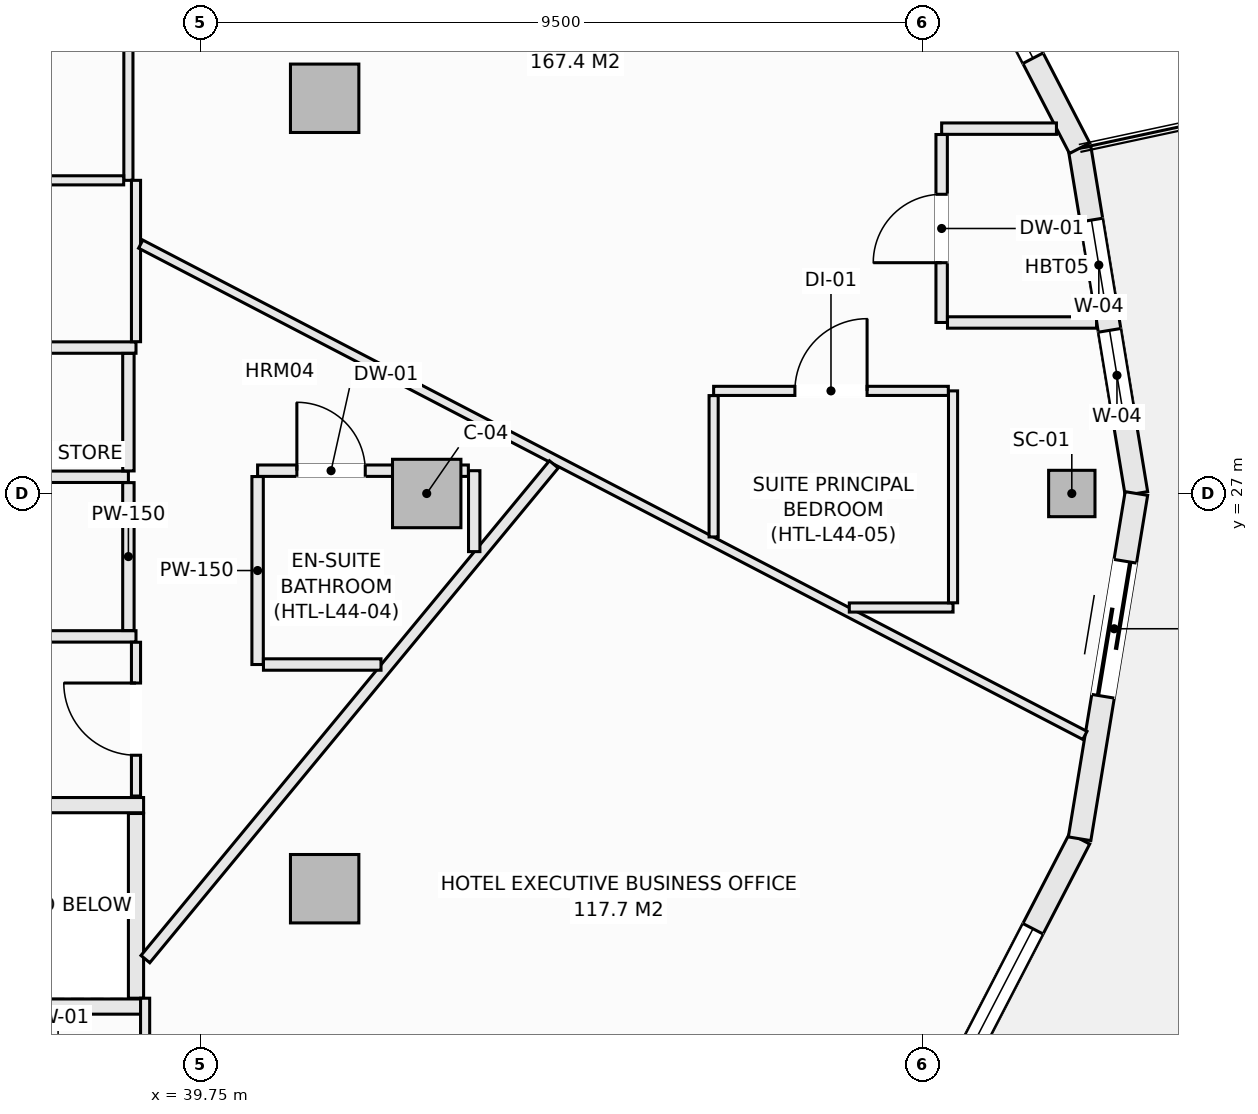
"""IFC4 building model, lengths in metres.
Left out: names, types, materials, properties, quantities, classifications, styles, units other than length and angle.
Written with IfcOpenShell. Run it as: python <this file> out.ifc"""

import sys

from ifc_helpers import new_model, si_unit, direction, frame, frame_2d, origin, origin_2d, place, context, subcontext, project, spatial, rectangle, hollow_rectangle, extrude, element, fill, save


model = new_model("IFC4")
c1 = context("Model", 3, precision=1e-05, world=origin(), true_north=direction((0.0, 1.0)))
c2 = subcontext(c1, "Body", "Model", "MODEL_VIEW")
j1 = project(units=[si_unit("LENGTHUNIT", "METRE"), si_unit("PLANEANGLEUNIT", "RADIAN")], contexts=[c1])
p1 = place(None, origin())
s1 = spatial("IfcSite", under=j1, at=p1, CompositionType="ELEMENT")
p2 = place(p1, origin())
s2 = spatial("IfcBuilding", under=s1, at=p2, CompositionType="ELEMENT")
p3 = place(p2, frame((0.0, 0.0, 169.9)))
s3 = spatial("IfcBuildingStorey", under=s2, at=p3, CompositionType="ELEMENT", Elevation=169.9)
p4 = place(p3, frame((51.212, 27.0, -0.27), z_axis=(0.0, 0.0, 1.0), x_axis=(1.0, 0.0, 0.0)))
e1 = element("IfcColumn", 1, at=p4, inside=s3, PredefinedType="COLUMN", context=c2, shape_type="SweptSolid", body=[
    extrude(hollow_rectangle(XDim=0.61, YDim=0.61, WallThickness=0.025, at=origin_2d()), origin(), (0.0, 0.0, 1.0), 3.4),
])
for number, where, z_axis, x_axis in (
    (2, (42.725, 27.0, -0.27), (0.0, 0.0, 1.0), (1.0, 0.0, 0.0)),
    (3, (41.382, 32.199, -0.27), (0.0, 0.0, 1.0), (1.0, 0.0, 0.0)),
    (4, (41.382, 21.801, -0.27), (0.0, 0.0, 1.0), (1.0, 0.0, 0.0)),
):
    element("IfcColumn", number, at=place(p3, frame(where, z_axis=z_axis, x_axis=x_axis)), inside=s3, PredefinedType="COLUMN", context=c2, shape_type="SweptSolid", body=[
        extrude(rectangle(XDim=0.9, YDim=0.9, at=origin_2d()), origin(), (0.0, 0.0, 1.0), 3.4),
    ])
p5 = place(p3, frame((51.315, 31.542, 0.0), z_axis=(0.0, 0.0, 1.0), x_axis=(0.162394765401, -0.986725868806, 0.0)))
e5 = element("IfcWall", 5, at=p5, inside=s3, PredefinedType="SOLIDWALL", context=c2, shape_type="SweptSolid", body=[
    extrude(rectangle(XDim=4.603, YDim=0.3, at=frame_2d((2.302, 0.0))), origin(), (0.0, 0.0, 1.0), 2.653),
])
p6 = place(p5, frame((0.958, 0.0, 0.74)))
e6 = element("IfcOpeningElement", 6, at=p6, cuts=e5, PredefinedType="OPENING", context=c2, shape_type="SweptSolid", body=[
    extrude(rectangle(XDim=1.2, YDim=1.7, at=frame_2d((0.6, 0.85))), frame((0.0, 0.16, 0.0), z_axis=(0.0, -1.0, 0.0), x_axis=(1.0, 0.0, 0.0)), (0.0, 0.0, 1.0), 0.32),
])
p7 = place(p5, frame((2.428, 0.0, 0.74)))
e7 = element("IfcOpeningElement", 7, at=p7, cuts=e5, PredefinedType="OPENING", context=c2, shape_type="SweptSolid", body=[
    extrude(rectangle(XDim=1.2, YDim=1.7, at=frame_2d((0.6, 0.85))), frame((0.0, 0.16, 0.0), z_axis=(0.0, -1.0, 0.0), x_axis=(1.0, 0.0, 0.0)), (0.0, 0.0, 1.0), 0.32),
])
p8 = place(p3, frame((49.123, 35.775, 0.0), z_axis=(0.0, 0.0, 1.0), x_axis=(0.459810251451, -0.888017191647, 0.0)))
e8 = element("IfcWall", 8, at=p8, inside=s3, PredefinedType="SOLIDWALL", context=c2, shape_type="SweptSolid", body=[
    extrude(rectangle(XDim=4.766, YDim=0.3, at=frame_2d((2.383, 0.0))), origin(), (0.0, 0.0, 1.0), 2.653),
])
p9 = place(p8, frame((1.333, 0.0, 0.74)))
e9 = element("IfcOpeningElement", 9, at=p9, cuts=e8, PredefinedType="OPENING", context=c2, shape_type="SweptSolid", body=[
    extrude(rectangle(XDim=2.1, YDim=1.7, at=frame_2d((1.05, 0.85))), frame((0.0, 0.16, 0.0), z_axis=(0.0, -1.0, 0.0), x_axis=(1.0, 0.0, 0.0)), (0.0, 0.0, 1.0), 0.32),
])
p10 = place(p3, frame((49.123, 18.225, 0.0), z_axis=(0.0, 0.0, 1.0), x_axis=(0.459810251451, 0.888017191647, 0.0)))
e10 = element("IfcWall", 10, at=p10, inside=s3, PredefinedType="SOLIDWALL", context=c2, shape_type="SweptSolid", body=[
    extrude(rectangle(XDim=4.766, YDim=0.3, at=frame_2d((2.383, 0.0))), origin(), (0.0, 0.0, 1.0), 2.653),
])
p11 = place(p10, frame((1.333, 0.0, 0.74)))
e11 = element("IfcOpeningElement", 11, at=p11, cuts=e10, PredefinedType="OPENING", context=c2, shape_type="SweptSolid", body=[
    extrude(rectangle(XDim=2.1, YDim=1.7, at=frame_2d((1.05, 0.85))), frame((0.0, 0.16, 0.0), z_axis=(0.0, -1.0, 0.0), x_axis=(1.0, 0.0, 0.0)), (0.0, 0.0, 1.0), 0.32),
])
p12 = place(p3, frame((51.315, 22.458, 0.0), z_axis=(0.0, 0.0, 1.0), x_axis=(0.162394765401, 0.986725868806, 0.0)))
e12 = element("IfcWall", 12, at=p12, inside=s3, PredefinedType="SOLIDWALL", context=c2, shape_type="SweptSolid", body=[
    extrude(rectangle(XDim=4.603, YDim=0.3, at=frame_2d((2.302, 0.0))), origin(), (0.0, 0.0, 1.0), 2.653),
])
p13 = place(p12, frame((1.9, 0.0, 0.0)))
e13 = element("IfcOpeningElement", 13, at=p13, cuts=e12, PredefinedType="OPENING", context=c2, shape_type="SweptSolid", body=[
    extrude(rectangle(XDim=1.8, YDim=2.25, at=frame_2d((0.9, 1.125))), frame((0.0, 0.16, 0.0), z_axis=(0.0, -1.0, 0.0), x_axis=(1.0, 0.0, 0.0)), (0.0, 0.0, 1.0), 0.32),
])
p14 = place(p3, frame((52.18, 16.779, 0.0), z_axis=(0.0, 0.0, 1.0), x_axis=(0.439637174641, 0.898175458735, 0.0)))
e14 = element("IfcWall", 14, at=p14, inside=s3, PredefinedType="PARAPET", context=c2, shape_type="SweptSolid", body=[
    extrude(rectangle(XDim=5.567, YDim=0.22, at=frame_2d((2.784, 0.0))), origin(), (0.0, 0.0, 1.0), 0.52),
])
for number, where, z_axis, x_axis in (
    (15, (36.75, 22.9, 0.0), (0.0, 0.0, 1.0), (1.0, 0.0, 0.0)),
    (16, (36.75, 20.25, 0.0), (0.0, 0.0, 1.0), (1.0, 0.0, 0.0)),
):
    element("IfcWall", number, at=place(p3, frame(where, z_axis=z_axis, x_axis=x_axis)), inside=s3, PredefinedType="SOLIDWALL", context=c2, shape_type="SweptSolid", body=[
        extrude(rectangle(XDim=2.25, YDim=0.2, at=frame_2d((1.125, 0.0))), origin(), (0.0, 0.0, 1.0), 3.13),
    ])
p15 = place(p3, frame((38.9, 20.36, 0.0), z_axis=(0.0, 0.0, 1.0), x_axis=(0.0, 1.0, 0.0)))
e17 = element("IfcWall", 17, at=p15, inside=s3, PredefinedType="SOLIDWALL", context=c2, shape_type="SweptSolid", body=[
    extrude(rectangle(XDim=2.43, YDim=0.2, at=frame_2d((1.215, 0.0))), origin(), (0.0, 0.0, 1.0), 3.13),
])
p16 = place(p3, frame((30.077, 28.92, 0.0), z_axis=(0.0, 0.0, 1.0), x_axis=(1.0, 0.0, 0.0)))
e18 = element("IfcWall", 18, at=p16, inside=s3, PredefinedType="PARTITIONING", context=c2, shape_type="SweptSolid", body=[
    extrude(rectangle(XDim=8.823, YDim=0.15, at=frame_2d((4.412, 0.0))), origin(), (0.0, 0.0, 1.0), 3.13),
])
p17 = place(p16, frame((1.342, 0.0, 0.0)))
e19 = element("IfcOpeningElement", 19, at=p17, cuts=e18, PredefinedType="OPENING", context=c2, shape_type="SweptSolid", body=[
    extrude(rectangle(XDim=0.95, YDim=2.1, at=frame_2d((0.475, 1.05))), frame((0.0, 0.085, 0.0), z_axis=(0.0, -1.0, 0.0), x_axis=(1.0, 0.0, 0.0)), (0.0, 0.0, 1.0), 0.17),
])
p18 = place(p16, frame((5.343, 0.0, 0.0)))
e20 = element("IfcOpeningElement", 20, at=p18, cuts=e18, PredefinedType="OPENING", context=c2, shape_type="SweptSolid", body=[
    extrude(rectangle(XDim=0.95, YDim=2.1, at=frame_2d((0.475, 1.05))), frame((0.0, 0.085, 0.0), z_axis=(0.0, -1.0, 0.0), x_axis=(1.0, 0.0, 0.0)), (0.0, 0.0, 1.0), 0.17),
])
p19 = place(p3, frame((33.377, 25.12, 0.0), z_axis=(0.0, 0.0, 1.0), x_axis=(1.0, 0.0, 0.0)))
e21 = element("IfcWall", 21, at=p19, inside=s3, PredefinedType="PARTITIONING", context=c2, shape_type="SweptSolid", body=[
    extrude(rectangle(XDim=5.523, YDim=0.15, at=frame_2d((2.761, 0.0))), origin(), (0.0, 0.0, 1.0), 3.13),
])
p20 = place(p19, frame((2.287, 0.0, 0.0)))
e22 = element("IfcOpeningElement", 22, at=p20, cuts=e21, PredefinedType="OPENING", context=c2, shape_type="SweptSolid", body=[
    extrude(rectangle(XDim=0.95, YDim=2.1, at=frame_2d((0.475, 1.05))), frame((0.0, 0.085, 0.0), z_axis=(0.0, -1.0, 0.0), x_axis=(1.0, 0.0, 0.0)), (0.0, 0.0, 1.0), 0.17),
])
p21 = place(p3, frame((33.377, 27.22, 0.0), z_axis=(0.0, 0.0, 1.0), x_axis=(1.0, 0.0, 0.0)))
e23 = element("IfcWall", 23, at=p21, inside=s3, PredefinedType="PARTITIONING", context=c2, shape_type="SweptSolid", body=[
    extrude(rectangle(XDim=5.423, YDim=0.15, at=frame_2d((2.711, 0.0))), origin(), (0.0, 0.0, 1.0), 3.13),
])
p22 = place(p3, frame((38.8, 25.197, 0.0), z_axis=(0.0, 0.0, 1.0), x_axis=(0.0, 1.0, 0.0)))
e24 = element("IfcWall", 24, at=p22, inside=s3, PredefinedType="PARTITIONING", context=c2, shape_type="SweptSolid", body=[
    extrude(rectangle(XDim=1.946, YDim=0.15, at=frame_2d((0.973, 0.0))), origin(), (0.0, 0.0, 1.0), 3.13),
])
p23 = place(p3, frame((38.8, 27.297, 0.0), z_axis=(0.0, 0.0, 1.0), x_axis=(0.0, 1.0, 0.0)))
e25 = element("IfcWall", 25, at=p23, inside=s3, PredefinedType="PARTITIONING", context=c2, shape_type="SweptSolid", body=[
    extrude(rectangle(XDim=1.546, YDim=0.15, at=frame_2d((0.773, 0.0))), origin(), (0.0, 0.0, 1.0), 3.13),
])
p24 = place(p3, frame((38.8, 31.12, 0.0), z_axis=(0.0, 0.0, 1.0), x_axis=(0.0, 1.0, 0.0)))
e26 = element("IfcWall", 26, at=p24, inside=s3, PredefinedType="PARTITIONING", context=c2, shape_type="SweptSolid", body=[
    extrude(rectangle(XDim=2.63, YDim=0.12, at=frame_2d((1.315, 0.0))), origin(), (0.0, 0.0, 1.0), 3.13),
])
p25 = place(p3, frame((30.062, 31.12, 0.0), z_axis=(0.0, 0.0, 1.0), x_axis=(1.0, 0.0, 0.0)))
e27 = element("IfcWall", 27, at=p25, inside=s3, PredefinedType="PARTITIONING", context=c2, shape_type="SweptSolid", body=[
    extrude(rectangle(XDim=8.676, YDim=0.12, at=frame_2d((4.338, 0.0))), origin(), (0.0, 0.0, 1.0), 3.13),
])
p26 = place(p25, frame((3.863, 0.0, 0.0)))
e28 = element("IfcOpeningElement", 28, at=p26, cuts=e27, PredefinedType="OPENING", context=c2, shape_type="SweptSolid", body=[
    extrude(rectangle(XDim=0.95, YDim=2.1, at=frame_2d((0.475, 1.05))), frame((0.0, 0.07, 0.0), z_axis=(0.0, -1.0, 0.0), x_axis=(1.0, 0.0, 0.0)), (0.0, 0.0, 1.0), 0.14),
])
p27 = place(p3, frame((39.02, 19.44, 0.0), z_axis=(0.0, 0.0, 1.0), x_axis=(0.0, 1.0, 0.0)))
e29 = element("IfcWall", 29, at=p27, inside=s3, PredefinedType="PARTITIONING", context=c2, shape_type="SweptSolid", body=[
    extrude(rectangle(XDim=0.92, YDim=0.12, at=frame_2d((0.46, 0.0))), origin(), (0.0, 0.0, 1.0), 3.13),
])
p28 = place(p3, frame((38.9, 23.02, 0.0), z_axis=(0.0, 0.0, 1.0), x_axis=(0.0, 1.0, 0.0)))
e30 = element("IfcWall", 30, at=p28, inside=s3, PredefinedType="PARTITIONING", context=c2, shape_type="SweptSolid", body=[
    extrude(rectangle(XDim=2.023, YDim=0.12, at=frame_2d((1.011, 0.0))), origin(), (0.0, 0.0, 1.0), 3.13),
])
p29 = place(p28, frame((0.537, 0.0, 0.0)))
e31 = element("IfcOpeningElement", 31, at=p29, cuts=e30, PredefinedType="OPENING", context=c2, shape_type="SweptSolid", body=[
    extrude(rectangle(XDim=0.95, YDim=2.1, at=frame_2d((0.475, 1.05))), frame((0.0, 0.07, 0.0), z_axis=(0.0, -1.0, 0.0), x_axis=(1.0, 0.0, 0.0)), (0.0, 0.0, 1.0), 0.14),
])
p30 = place(p3, frame((38.9, 28.997, 0.0), z_axis=(0.0, 0.0, 1.0), x_axis=(0.0, 1.0, 0.0)))
e32 = element("IfcWall", 32, at=p30, inside=s3, PredefinedType="PARTITIONING", context=c2, shape_type="SweptSolid", body=[
    extrude(rectangle(XDim=2.123, YDim=0.12, at=frame_2d((1.062, 0.0))), origin(), (0.0, 0.0, 1.0), 3.13),
])
p31 = place(p3, frame((38.962, 30.281, 0.0), z_axis=(0.0, 0.0, 1.0), x_axis=(0.887114590422, -0.461549242725, 0.0)))
e33 = element("IfcWall", 33, at=p31, inside=s3, PredefinedType="PARTITIONING", context=c2, shape_type="SweptSolid", body=[
    extrude(rectangle(XDim=14.004, YDim=0.12, at=frame_2d((7.002, 0.0))), origin(), (0.0, 0.0, 1.0), 2.505),
])
p32 = place(p3, frame((39.023, 20.874, 0.0), z_axis=(0.0, 0.0, 1.0), x_axis=(0.636698291185, 0.771113017658, 0.0)))
e34 = element("IfcWall", 34, at=p32, inside=s3, PredefinedType="PARTITIONING", context=c2, shape_type="SweptSolid", body=[
    extrude(rectangle(XDim=8.44, YDim=0.15, at=frame_2d((4.22, 0.0))), origin(), (0.0, 0.0, 1.0), 2.505),
])
p33 = place(p3, frame((43.35, 26.235, 0.0), z_axis=(0.0, 0.0, 1.0), x_axis=(0.0, 1.0, 0.0)))
e35 = element("IfcWall", 35, at=p33, inside=s3, PredefinedType="PARTITIONING", context=c2, shape_type="SweptSolid", body=[
    extrude(rectangle(XDim=1.065, YDim=0.15, at=frame_2d((0.532, 0.0))), origin(), (0.0, 0.0, 1.0), 3.13),
])
p34 = place(p3, frame((40.5, 27.3, 0.0), z_axis=(0.0, 0.0, 1.0), x_axis=(1.0, 0.0, 0.0)))
e36 = element("IfcWall", 36, at=p34, inside=s3, PredefinedType="PARTITIONING", context=c2, shape_type="SweptSolid", body=[
    extrude(rectangle(XDim=2.773, YDim=0.15, at=frame_2d((1.386, 0.0))), origin(), (0.0, 0.0, 1.0), 3.13),
])
p35 = place(p34, frame((0.517, 0.0, 0.0)))
e37 = element("IfcOpeningElement", 37, at=p35, cuts=e36, PredefinedType="OPENING", context=c2, shape_type="SweptSolid", body=[
    extrude(rectangle(XDim=0.9, YDim=2.1, at=frame_2d((0.45, 1.05))), frame((0.0, 0.085, 0.0), z_axis=(0.0, -1.0, 0.0), x_axis=(1.0, 0.0, 0.0)), (0.0, 0.0, 1.0), 0.17),
])
p36 = place(p3, frame((40.5, 24.75, 0.0), z_axis=(0.0, 0.0, 1.0), x_axis=(0.0, 1.0, 0.0)))
e38 = element("IfcWall", 38, at=p36, inside=s3, PredefinedType="PARTITIONING", context=c2, shape_type="SweptSolid", body=[
    extrude(rectangle(XDim=2.473, YDim=0.15, at=frame_2d((1.236, 0.0))), origin(), (0.0, 0.0, 1.0), 3.13),
])
p37 = place(p3, frame((40.577, 24.75, 0.0), z_axis=(0.0, 0.0, 1.0), x_axis=(1.0, 0.0, 0.0)))
e39 = element("IfcWall", 39, at=p37, inside=s3, PredefinedType="PARTITIONING", context=c2, shape_type="SweptSolid", body=[
    extrude(rectangle(XDim=1.547, YDim=0.15, at=frame_2d((0.773, 0.0))), origin(), (0.0, 0.0, 1.0), 3.13),
])
p38 = place(p3, frame((49.5, 31.8, 0.0), z_axis=(0.0, 0.0, 1.0), x_axis=(1.0, 0.0, 0.0)))
e40 = element("IfcWall", 40, at=p38, inside=s3, PredefinedType="PARTITIONING", context=c2, shape_type="SweptSolid", body=[
    extrude(rectangle(XDim=1.51, YDim=0.15, at=frame_2d((0.755, 0.0))), origin(), (0.0, 0.0, 1.0), 3.13),
])
p39 = place(p3, frame((49.5, 29.25, 0.0), z_axis=(0.0, 0.0, 1.0), x_axis=(0.0, 1.0, 0.0)))
e41 = element("IfcWall", 41, at=p39, inside=s3, PredefinedType="PARTITIONING", context=c2, shape_type="SweptSolid", body=[
    extrude(rectangle(XDim=2.473, YDim=0.15, at=frame_2d((1.236, 0.0))), origin(), (0.0, 0.0, 1.0), 2.653),
])
p40 = place(p39, frame((0.787, 0.0, 0.0)))
e42 = element("IfcOpeningElement", 42, at=p40, cuts=e41, PredefinedType="OPENING", context=c2, shape_type="SweptSolid", body=[
    extrude(rectangle(XDim=0.9, YDim=2.1, at=frame_2d((0.45, 1.05))), frame((0.0, 0.085, 0.0), z_axis=(0.0, -1.0, 0.0), x_axis=(1.0, 0.0, 0.0)), (0.0, 0.0, 1.0), 0.17),
])
p41 = place(p3, frame((49.577, 29.25, 0.0), z_axis=(0.0, 0.0, 1.0), x_axis=(1.0, 0.0, 0.0)))
e43 = element("IfcWall", 43, at=p41, inside=s3, PredefinedType="PARTITIONING", context=c2, shape_type="SweptSolid", body=[
    extrude(rectangle(XDim=1.961, YDim=0.15, at=frame_2d((0.98, 0.0))), origin(), (0.0, 0.0, 1.0), 3.13),
])
p42 = place(p3, frame((48.285, 25.5, 0.0), z_axis=(0.0, 0.0, 1.0), x_axis=(1.0, 0.0, 0.0)))
e44 = element("IfcWall", 44, at=p42, inside=s3, PredefinedType="PARTITIONING", context=c2, shape_type="SweptSolid", body=[
    extrude(rectangle(XDim=1.365, YDim=0.12, at=frame_2d((0.682, 0.0))), origin(), (0.0, 0.0, 1.0), 3.13),
])
p43 = place(p3, frame((49.65, 25.562, 0.0), z_axis=(0.0, 0.0, 1.0), x_axis=(0.0, 1.0, 0.0)))
e45 = element("IfcWall", 45, at=p43, inside=s3, PredefinedType="PARTITIONING", context=c2, shape_type="SweptSolid", body=[
    extrude(rectangle(XDim=2.788, YDim=0.12, at=frame_2d((1.394, 0.0))), origin(), (0.0, 0.0, 1.0), 3.13),
])
p44 = place(p3, frame((46.5, 28.35, 0.0), z_axis=(0.0, 0.0, 1.0), x_axis=(1.0, 0.0, 0.0)))
e46 = element("IfcWall", 46, at=p44, inside=s3, PredefinedType="PARTITIONING", context=c2, shape_type="SweptSolid", body=[
    extrude(rectangle(XDim=3.088, YDim=0.12, at=frame_2d((1.544, 0.0))), origin(), (0.0, 0.0, 1.0), 3.13),
])
p45 = place(p44, frame((1.069, 0.0, 0.0)))
e47 = element("IfcOpeningElement", 47, at=p45, cuts=e46, PredefinedType="OPENING", context=c2, shape_type="SweptSolid", body=[
    extrude(rectangle(XDim=0.95, YDim=2.1, at=frame_2d((0.475, 1.05))), frame((0.0, 0.07, 0.0), z_axis=(0.0, -1.0, 0.0), x_axis=(1.0, 0.0, 0.0)), (0.0, 0.0, 1.0), 0.14),
])
p46 = place(p3, frame((46.5, 26.429, 0.0), z_axis=(0.0, 0.0, 1.0), x_axis=(0.0, 1.0, 0.0)))
e48 = element("IfcWall", 48, at=p46, inside=s3, PredefinedType="PARTITIONING", context=c2, shape_type="SweptSolid", body=[
    extrude(rectangle(XDim=1.859, YDim=0.12, at=frame_2d((0.93, 0.0))), origin(), (0.0, 0.0, 1.0), 3.13),
])
p47 = place(p6, origin())
e49 = element("IfcWindow", 49, at=p47, inside=s3, PartitioningType="SINGLE_PANEL", PredefinedType="WINDOW", context=c2, shape_type="SweptSolid", body=[
    extrude(rectangle(XDim=1.2, YDim=1.7, at=frame_2d((0.6, 0.85))), frame((0.0, 0.03, 0.0), z_axis=(0.0, -1.0, 0.0), x_axis=(1.0, 0.0, 0.0)), (0.0, 0.0, 1.0), 0.06),
])
fill(e6, e49)
p48 = place(p9, origin())
e50 = element("IfcWindow", 50, at=p48, inside=s3, PartitioningType="SINGLE_PANEL", PredefinedType="WINDOW", context=c2, shape_type="SweptSolid", body=[
    extrude(rectangle(XDim=2.1, YDim=1.7, at=frame_2d((1.05, 0.85))), frame((0.0, 0.03, 0.0), z_axis=(0.0, -1.0, 0.0), x_axis=(1.0, 0.0, 0.0)), (0.0, 0.0, 1.0), 0.06),
])
fill(e9, e50)
p49 = place(p11, origin())
e51 = element("IfcWindow", 51, at=p49, inside=s3, PartitioningType="SINGLE_PANEL", PredefinedType="WINDOW", context=c2, shape_type="SweptSolid", body=[
    extrude(rectangle(XDim=2.1, YDim=1.7, at=frame_2d((1.05, 0.85))), frame((0.0, 0.03, 0.0), z_axis=(0.0, -1.0, 0.0), x_axis=(1.0, 0.0, 0.0)), (0.0, 0.0, 1.0), 0.06),
])
fill(e11, e51)
p50 = place(p13, frame((1.8, 0.0, 0.0), z_axis=(0.0, 0.0, 1.0), x_axis=(-1.0, 0.0, 0.0)))
e52 = element("IfcDoor", 52, at=p50, inside=s3, OperationType="SLIDING_TO_LEFT", PredefinedType="DOOR", context=c2, shape_type="SweptSolid", body=[
    extrude(rectangle(XDim=1.8, YDim=2.25, at=frame_2d((0.9, 1.125))), frame((0.0, 0.025, 0.0), z_axis=(0.0, -1.0, 0.0), x_axis=(1.0, 0.0, 0.0)), (0.0, 0.0, 1.0), 0.05),
])
fill(e13, e52)
p51 = place(p29, origin())
e53 = element("IfcDoor", 53, at=p51, inside=s3, OperationType="SINGLE_SWING_RIGHT", PredefinedType="DOOR", context=c2, shape_type="SweptSolid", body=[
    extrude(rectangle(XDim=0.95, YDim=2.1, at=frame_2d((0.475, 1.05))), frame((0.0, 0.025, 0.0), z_axis=(0.0, -1.0, 0.0), x_axis=(1.0, 0.0, 0.0)), (0.0, 0.0, 1.0), 0.05),
])
fill(e31, e53)
p52 = place(p35, origin())
e54 = element("IfcDoor", 54, at=p52, inside=s3, OperationType="SINGLE_SWING_LEFT", PredefinedType="DOOR", context=c2, shape_type="SweptSolid", body=[
    extrude(rectangle(XDim=0.9, YDim=2.1, at=frame_2d((0.45, 1.05))), frame((0.0, 0.025, 0.0), z_axis=(0.0, -1.0, 0.0), x_axis=(1.0, 0.0, 0.0)), (0.0, 0.0, 1.0), 0.05),
])
fill(e37, e54)
p53 = place(p45, origin())
e55 = element("IfcDoor", 55, at=p53, inside=s3, OperationType="SINGLE_SWING_RIGHT", PredefinedType="DOOR", context=c2, shape_type="SweptSolid", body=[
    extrude(rectangle(XDim=0.95, YDim=2.1, at=frame_2d((0.475, 1.05))), frame((0.0, 0.025, 0.0), z_axis=(0.0, -1.0, 0.0), x_axis=(1.0, 0.0, 0.0)), (0.0, 0.0, 1.0), 0.05),
])
fill(e47, e55)
p54 = place(p40, origin())
e56 = element("IfcDoor", 56, at=p54, inside=s3, OperationType="SINGLE_SWING_LEFT", PredefinedType="DOOR", context=c2, shape_type="SweptSolid", body=[
    extrude(rectangle(XDim=0.9, YDim=2.1, at=frame_2d((0.45, 1.05))), frame((0.0, 0.025, 0.0), z_axis=(0.0, -1.0, 0.0), x_axis=(1.0, 0.0, 0.0)), (0.0, 0.0, 1.0), 0.05),
])
fill(e42, e56)
p55 = place(p7, origin())
e57 = element("IfcWindow", 57, at=p55, inside=s3, PartitioningType="SINGLE_PANEL", PredefinedType="WINDOW", context=c2, shape_type="SweptSolid", body=[
    extrude(rectangle(XDim=1.2, YDim=1.7, at=frame_2d((0.6, 0.85))), frame((0.0, 0.03, 0.0), z_axis=(0.0, -1.0, 0.0), x_axis=(1.0, 0.0, 0.0)), (0.0, 0.0, 1.0), 0.06),
])
fill(e7, e57)
save(model, sys.argv[1])
